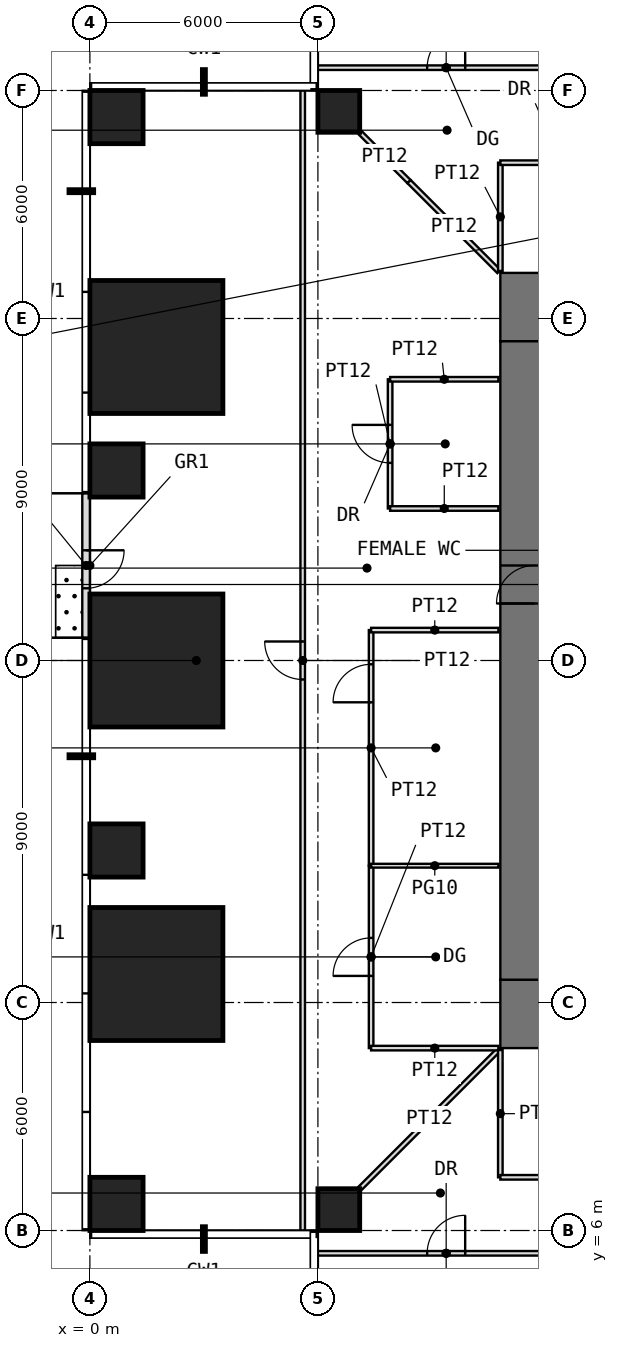
"""IFC4 building model, lengths in metres.
Left out: names, types, materials, properties, quantities, classifications, styles, units other than length and angle.
Written with IfcOpenShell. Run it as: python <this file> out.ifc"""

import sys

from ifc_helpers import new_model, si_unit, direction, frame, frame_2d, origin, origin_2d, place, context, subcontext, project, spatial, rectangle, extrude, element, fill, save


model = new_model("IFC4")
c1 = context("Model", 3, precision=1e-05, world=origin(), true_north=direction((0.0, 1.0)))
c2 = subcontext(c1, "Body", "Model", "MODEL_VIEW")
j1 = project(units=[si_unit("LENGTHUNIT", "METRE"), si_unit("PLANEANGLEUNIT", "RADIAN")], contexts=[c1])
p1 = place(None, origin())
s1 = spatial("IfcSite", under=j1, at=p1, CompositionType="ELEMENT")
p2 = place(p1, origin())
s2 = spatial("IfcBuilding", under=s1, at=p2, CompositionType="ELEMENT")
p3 = place(p2, frame((0.0, 0.0, 42.5)))
s3 = spatial("IfcBuildingStorey", under=s2, at=p3, CompositionType="ELEMENT", Elevation=42.5)
p4 = place(p3, frame((0.7, 6.7, 0.0), z_axis=(0.0, 0.0, 1.0), x_axis=(1.0, 0.0, 0.0)))
e1 = element("IfcColumn", 1, at=p4, inside=s3, PredefinedType="COLUMN", context=c2, shape_type="SweptSolid", body=[
    extrude(rectangle(XDim=1.4, YDim=1.4, at=origin_2d()), origin(), (0.0, 0.0, 1.0), 4.0),
])
p5 = place(p3, frame((6.55, 6.55, 0.0), z_axis=(0.0, 0.0, 1.0), x_axis=(1.0, 0.0, 0.0)))
e2 = element("IfcColumn", 2, at=p5, inside=s3, PredefinedType="COLUMN", context=c2, shape_type="SweptSolid", body=[
    extrude(rectangle(XDim=1.1, YDim=1.1, at=origin_2d()), origin(), (0.0, 0.0, 1.0), 4.0),
])
p6 = place(p3, frame((1.75, 12.75, 0.0), z_axis=(0.0, 0.0, 1.0), x_axis=(1.0, 0.0, 0.0)))
e3 = element("IfcColumn", 3, at=p6, inside=s3, PredefinedType="COLUMN", context=c2, shape_type="SweptSolid", body=[
    extrude(rectangle(XDim=3.5, YDim=3.5, at=origin_2d()), origin(), (0.0, 0.0, 1.0), 4.0),
])
p7 = place(p3, frame((0.7, 16.0, 0.0), z_axis=(0.0, 0.0, 1.0), x_axis=(1.0, 0.0, 0.0)))
e4 = element("IfcColumn", 4, at=p7, inside=s3, PredefinedType="COLUMN", context=c2, shape_type="SweptSolid", body=[
    extrude(rectangle(XDim=1.4, YDim=1.4, at=origin_2d()), origin(), (0.0, 0.0, 1.0), 4.0),
])
p8 = place(p3, frame((1.75, 21.0, 0.0), z_axis=(0.0, 0.0, 1.0), x_axis=(1.0, 0.0, 0.0)))
e5 = element("IfcColumn", 5, at=p8, inside=s3, PredefinedType="COLUMN", context=c2, shape_type="SweptSolid", body=[
    extrude(rectangle(XDim=3.5, YDim=3.5, at=origin_2d()), origin(), (0.0, 0.0, 1.0), 4.0),
])
p9 = place(p3, frame((0.7, 26.0, 0.0), z_axis=(0.0, 0.0, 1.0), x_axis=(1.0, 0.0, 0.0)))
e6 = element("IfcColumn", 6, at=p9, inside=s3, PredefinedType="COLUMN", context=c2, shape_type="SweptSolid", body=[
    extrude(rectangle(XDim=1.4, YDim=1.4, at=origin_2d()), origin(), (0.0, 0.0, 1.0), 4.0),
])
p10 = place(p3, frame((1.75, 29.25, 0.0), z_axis=(0.0, 0.0, 1.0), x_axis=(1.0, 0.0, 0.0)))
e7 = element("IfcColumn", 7, at=p10, inside=s3, PredefinedType="COLUMN", context=c2, shape_type="SweptSolid", body=[
    extrude(rectangle(XDim=3.5, YDim=3.5, at=origin_2d()), origin(), (0.0, 0.0, 1.0), 4.0),
])
p11 = place(p3, frame((0.7, 35.3, 0.0), z_axis=(0.0, 0.0, 1.0), x_axis=(1.0, 0.0, 0.0)))
e8 = element("IfcColumn", 8, at=p11, inside=s3, PredefinedType="COLUMN", context=c2, shape_type="SweptSolid", body=[
    extrude(rectangle(XDim=1.4, YDim=1.4, at=origin_2d()), origin(), (0.0, 0.0, 1.0), 4.0),
])
p12 = place(p3, frame((6.55, 35.45, 0.0), z_axis=(0.0, 0.0, 1.0), x_axis=(1.0, 0.0, 0.0)))
e9 = element("IfcColumn", 9, at=p12, inside=s3, PredefinedType="COLUMN", context=c2, shape_type="SweptSolid", body=[
    extrude(rectangle(XDim=1.1, YDim=1.1, at=origin_2d()), origin(), (0.0, 0.0, 1.0), 4.0),
])
p13 = place(p3, frame((-0.1, 25.4, 0.0), z_axis=(0.0, 0.0, 1.0), x_axis=(0.0, -1.0, 0.0)))
e10 = element("IfcWall", 10, at=p13, inside=s3, PredefinedType="USERDEFINED", context=c2, shape_type="SweptSolid", body=[
    extrude(rectangle(XDim=3.8, YDim=0.2, at=frame_2d((1.9, 0.0))), origin(), (0.0, 0.0, 1.0), 3.75),
])
p14 = place(p13, frame((1.5, 0.0, 0.0)))
e11 = element("IfcOpeningElement", 11, at=p14, cuts=e10, PredefinedType="OPENING", context=c2, shape_type="SweptSolid", body=[
    extrude(rectangle(XDim=1.0, YDim=2.4, at=frame_2d((0.5, 1.2))), frame((0.0, 0.11, 0.0), z_axis=(0.0, -1.0, 0.0), x_axis=(1.0, 0.0, 0.0)), (0.0, 0.0, 1.0), 0.22),
])
p15 = place(p3, frame((10.8, 11.7, -0.05), z_axis=(0.0, 0.0, 1.0), x_axis=(1.0, 0.0, 0.0)))
e12 = element("IfcWall", 12, at=p15, inside=s3, PredefinedType="SHEAR", context=c2, shape_type="SweptSolid", body=[
    extrude(rectangle(XDim=20.4, YDim=1.8, at=frame_2d((10.2, 0.0))), origin(), (0.0, 0.0, 1.0), 4.0),
])
p16 = place(p15, frame((9.2, 0.0, 0.05)))
e13 = element("IfcOpeningElement", 13, at=p16, cuts=e12, PredefinedType="OPENING", context=c2, shape_type="SweptSolid", body=[
    extrude(rectangle(XDim=2.0, YDim=2.2, at=frame_2d((1.0, 1.1))), frame((0.0, 0.91, 0.0), z_axis=(0.0, -1.0, 0.0), x_axis=(1.0, 0.0, 0.0)), (0.0, 0.0, 1.0), 1.82),
])
p17 = place(p3, frame((10.8, 30.3, -0.05), z_axis=(0.0, 0.0, 1.0), x_axis=(1.0, 0.0, 0.0)))
e14 = element("IfcWall", 14, at=p17, inside=s3, PredefinedType="SHEAR", context=c2, shape_type="SweptSolid", body=[
    extrude(rectangle(XDim=20.4, YDim=1.8, at=frame_2d((10.2, 0.0))), origin(), (0.0, 0.0, 1.0), 4.0),
])
p18 = place(p17, frame((9.2, 0.0, 0.05)))
e15 = element("IfcOpeningElement", 15, at=p18, cuts=e14, PredefinedType="OPENING", context=c2, shape_type="SweptSolid", body=[
    extrude(rectangle(XDim=2.0, YDim=2.2, at=frame_2d((1.0, 1.1))), frame((0.0, 0.91, 0.0), z_axis=(0.0, -1.0, 0.0), x_axis=(1.0, 0.0, 0.0)), (0.0, 0.0, 1.0), 1.82),
])
p19 = place(p3, frame((11.7, 12.6, -0.05), z_axis=(0.0, 0.0, 1.0), x_axis=(0.0, 1.0, 0.0)))
e16 = element("IfcWall", 16, at=p19, inside=s3, PredefinedType="SHEAR", context=c2, shape_type="SweptSolid", body=[
    extrude(rectangle(XDim=16.8, YDim=1.8, at=frame_2d((8.4, 0.0))), origin(), (0.0, 0.0, 1.0), 4.0),
])
p20 = place(p19, frame((9.9, 0.0, 0.05)))
e17 = element("IfcOpeningElement", 17, at=p20, cuts=e16, PredefinedType="OPENING", context=c2, shape_type="SweptSolid", body=[
    extrude(rectangle(XDim=1.0, YDim=2.2, at=frame_2d((0.5, 1.1))), frame((0.0, 0.91, 0.0), z_axis=(0.0, -1.0, 0.0), x_axis=(1.0, 0.0, 0.0)), (0.0, 0.0, 1.0), 1.82),
])
p21 = place(p3, frame((5.6, 6.0, 0.0), z_axis=(0.0, 0.0, 1.0), x_axis=(0.0, 1.0, 0.0)))
e18 = element("IfcWall", 18, at=p21, inside=s3, PredefinedType="PARTITIONING", context=c2, shape_type="SweptSolid", body=[
    extrude(rectangle(XDim=30.0, YDim=0.12, at=frame_2d((15.0, 0.0))), origin(), (0.0, 0.0, 1.0), 3.75),
])
p22 = place(p21, frame((14.5, 0.0, 0.0)))
e19 = element("IfcOpeningElement", 19, at=p22, cuts=e18, PredefinedType="OPENING", context=c2, shape_type="SweptSolid", body=[
    extrude(rectangle(XDim=1.0, YDim=2.4, at=frame_2d((0.5, 1.2))), frame((0.0, 0.07, 0.0), z_axis=(0.0, -1.0, 0.0), x_axis=(1.0, 0.0, 0.0)), (0.0, 0.0, 1.0), 0.14),
])
p23 = place(p3, frame((6.0, 5.4, 0.0), z_axis=(0.0, 0.0, 1.0), x_axis=(1.0, 0.0, 0.0)))
e20 = element("IfcWall", 20, at=p23, inside=s3, PredefinedType="PARTITIONING", context=c2, shape_type="SweptSolid", body=[
    extrude(rectangle(XDim=6.75, YDim=0.12, at=frame_2d((3.375, 0.0))), origin(), (0.0, 0.0, 1.0), 3.75),
])
p24 = place(p23, frame((2.875, 0.0, 0.0)))
e21 = element("IfcOpeningElement", 21, at=p24, cuts=e20, PredefinedType="OPENING", context=c2, shape_type="SweptSolid", body=[
    extrude(rectangle(XDim=1.0, YDim=2.2, at=frame_2d((0.5, 1.1))), frame((0.0, 0.07, 0.0), z_axis=(0.0, -1.0, 0.0), x_axis=(1.0, 0.0, 0.0)), (0.0, 0.0, 1.0), 0.14),
])
p25 = place(p3, frame((6.0, 36.6, 0.0), z_axis=(0.0, 0.0, 1.0), x_axis=(1.0, 0.0, 0.0)))
e22 = element("IfcWall", 22, at=p25, inside=s3, PredefinedType="PARTITIONING", context=c2, shape_type="SweptSolid", body=[
    extrude(rectangle(XDim=6.75, YDim=0.12, at=frame_2d((3.375, 0.0))), origin(), (0.0, 0.0, 1.0), 3.75),
])
p26 = place(p25, frame((2.875, 0.0, 0.0)))
e23 = element("IfcOpeningElement", 23, at=p26, cuts=e22, PredefinedType="OPENING", context=c2, shape_type="SweptSolid", body=[
    extrude(rectangle(XDim=1.0, YDim=2.4, at=frame_2d((0.5, 1.2))), frame((0.0, 0.07, 0.0), z_axis=(0.0, -1.0, 0.0), x_axis=(1.0, 0.0, 0.0)), (0.0, 0.0, 1.0), 0.14),
])
p27 = place(p3, frame((7.11, 7.11, 0.0), z_axis=(0.0, 0.0, 1.0), x_axis=(0.707106781187, 0.707106781187, 0.0)))
e24 = element("IfcWall", 24, at=p27, inside=s3, PredefinedType="PARTITIONING", context=c2, shape_type="SweptSolid", body=[
    extrude(rectangle(XDim=5.168, YDim=0.12, at=frame_2d((2.584, 0.0))), origin(), (0.0, 0.0, 1.0), 3.75),
])
p28 = place(p3, frame((7.11, 34.89, 0.0), z_axis=(0.0, 0.0, 1.0), x_axis=(0.707106781187, -0.707106781187, 0.0)))
e25 = element("IfcWall", 25, at=p28, inside=s3, PredefinedType="PARTITIONING", context=c2, shape_type="SweptSolid", body=[
    extrude(rectangle(XDim=1.822, YDim=0.12, at=frame_2d((0.911, 0.0))), origin(), (0.0, 0.0, 1.0), 3.75),
])
p29 = place(p3, frame((7.4, 10.8, 0.0), z_axis=(0.0, 0.0, 1.0), x_axis=(0.0, 1.0, 0.0)))
e26 = element("IfcWall", 26, at=p29, inside=s3, PredefinedType="PARTITIONING", context=c2, shape_type="SweptSolid", body=[
    extrude(rectangle(XDim=4.8, YDim=0.12, at=frame_2d((2.4, 0.0))), origin(), (0.0, 0.0, 1.0), 3.75),
])
p30 = place(p29, frame((1.9, 0.0, 0.0)))
e27 = element("IfcOpeningElement", 27, at=p30, cuts=e26, PredefinedType="OPENING", context=c2, shape_type="SweptSolid", body=[
    extrude(rectangle(XDim=1.0, YDim=2.4, at=frame_2d((0.5, 1.2))), frame((0.0, 0.07, 0.0), z_axis=(0.0, -1.0, 0.0), x_axis=(1.0, 0.0, 0.0)), (0.0, 0.0, 1.0), 0.14),
])
p31 = place(p3, frame((7.4, 10.8, 0.0), z_axis=(0.0, 0.0, 1.0), x_axis=(1.0, 0.0, 0.0)))
e28 = element("IfcWall", 28, at=p31, inside=s3, PredefinedType="PARTITIONING", context=c2, shape_type="SweptSolid", body=[
    extrude(rectangle(XDim=3.35, YDim=0.12, at=frame_2d((1.675, 0.0))), origin(), (0.0, 0.0, 1.0), 3.75),
])
p32 = place(p3, frame((7.4, 15.6, 0.0), z_axis=(0.0, 0.0, 1.0), x_axis=(0.0, 1.0, 0.0)))
e29 = element("IfcWall", 29, at=p32, inside=s3, PredefinedType="PARTITIONING", context=c2, shape_type="SweptSolid", body=[
    extrude(rectangle(XDim=6.2, YDim=0.12, at=frame_2d((3.1, 0.0))), origin(), (0.0, 0.0, 1.0), 3.75),
])
p33 = place(p32, frame((4.3, 0.0, 0.0)))
e30 = element("IfcOpeningElement", 30, at=p33, cuts=e29, PredefinedType="OPENING", context=c2, shape_type="SweptSolid", body=[
    extrude(rectangle(XDim=1.0, YDim=2.4, at=frame_2d((0.5, 1.2))), frame((0.0, 0.07, 0.0), z_axis=(0.0, -1.0, 0.0), x_axis=(1.0, 0.0, 0.0)), (0.0, 0.0, 1.0), 0.14),
])
p34 = place(p3, frame((7.4, 15.6, 0.0), z_axis=(0.0, 0.0, 1.0), x_axis=(1.0, 0.0, 0.0)))
e31 = element("IfcWall", 31, at=p34, inside=s3, PredefinedType="PARTITIONING", context=c2, shape_type="SweptSolid", body=[
    extrude(rectangle(XDim=3.35, YDim=0.1, at=frame_2d((1.675, 0.0))), origin(), (0.0, 0.0, 1.0), 3.75),
])
p35 = place(p3, frame((7.4, 21.8, 0.0), z_axis=(0.0, 0.0, 1.0), x_axis=(1.0, 0.0, 0.0)))
e32 = element("IfcWall", 32, at=p35, inside=s3, PredefinedType="PARTITIONING", context=c2, shape_type="SweptSolid", body=[
    extrude(rectangle(XDim=3.35, YDim=0.12, at=frame_2d((1.675, 0.0))), origin(), (0.0, 0.0, 1.0), 3.75),
])
p36 = place(p3, frame((7.9, 25.0, 0.0), z_axis=(0.0, 0.0, 1.0), x_axis=(0.0, 1.0, 0.0)))
e33 = element("IfcWall", 33, at=p36, inside=s3, PredefinedType="PARTITIONING", context=c2, shape_type="SweptSolid", body=[
    extrude(rectangle(XDim=3.4, YDim=0.12, at=frame_2d((1.7, 0.0))), origin(), (0.0, 0.0, 1.0), 3.75),
])
p37 = place(p36, frame((1.2, 0.0, 0.0)))
e34 = element("IfcOpeningElement", 34, at=p37, cuts=e33, PredefinedType="OPENING", context=c2, shape_type="SweptSolid", body=[
    extrude(rectangle(XDim=1.0, YDim=2.2, at=frame_2d((0.5, 1.1))), frame((0.0, 0.07, 0.0), z_axis=(0.0, -1.0, 0.0), x_axis=(1.0, 0.0, 0.0)), (0.0, 0.0, 1.0), 0.14),
])
for number, where, z_axis, x_axis in (
    (35, (7.9, 25.0, 0.0), (0.0, 0.0, 1.0), (1.0, 0.0, 0.0)),
    (36, (7.9, 28.4, 0.0), (0.0, 0.0, 1.0), (1.0, 0.0, 0.0)),
):
    element("IfcWall", number, at=place(p3, frame(where, z_axis=z_axis, x_axis=x_axis)), inside=s3, PredefinedType="PARTITIONING", context=c2, shape_type="SweptSolid", body=[
        extrude(rectangle(XDim=2.85, YDim=0.12, at=frame_2d((1.425, 0.0))), origin(), (0.0, 0.0, 1.0), 3.75),
    ])
p38 = place(p3, frame((8.398, 33.602, 0.0), z_axis=(0.0, 0.0, 1.0), x_axis=(0.707106781187, -0.707106781187, 0.0)))
e37 = element("IfcWall", 37, at=p38, inside=s3, PredefinedType="PARTITIONING", context=c2, shape_type="SweptSolid", body=[
    extrude(rectangle(XDim=3.346, YDim=0.12, at=frame_2d((1.673, 0.0))), origin(), (0.0, 0.0, 1.0), 3.75),
])
p39 = place(p3, frame((10.8, 7.4, 0.0), z_axis=(0.0, 0.0, 1.0), x_axis=(0.0, 1.0, 0.0)))
e38 = element("IfcWall", 38, at=p39, inside=s3, PredefinedType="PARTITIONING", context=c2, shape_type="SweptSolid", body=[
    extrude(rectangle(XDim=3.35, YDim=0.12, at=frame_2d((1.675, 0.0))), origin(), (0.0, 0.0, 1.0), 3.75),
])
p40 = place(p3, frame((10.8, 7.4, 0.0), z_axis=(0.0, 0.0, 1.0), x_axis=(1.0, 0.0, 0.0)))
e39 = element("IfcWall", 39, at=p40, inside=s3, PredefinedType="PARTITIONING", context=c2, shape_type="SweptSolid", body=[
    extrude(rectangle(XDim=4.0, YDim=0.12, at=frame_2d((2.0, 0.0))), origin(), (0.0, 0.0, 1.0), 3.75),
])
p41 = place(p40, frame((1.5, 0.0, 0.0)))
e40 = element("IfcOpeningElement", 40, at=p41, cuts=e39, PredefinedType="OPENING", context=c2, shape_type="SweptSolid", body=[
    extrude(rectangle(XDim=1.0, YDim=2.4, at=frame_2d((0.5, 1.2))), frame((0.0, 0.07, 0.0), z_axis=(0.0, -1.0, 0.0), x_axis=(1.0, 0.0, 0.0)), (0.0, 0.0, 1.0), 0.14),
])
p42 = place(p3, frame((10.8, 31.25, 0.0), z_axis=(0.0, 0.0, 1.0), x_axis=(0.0, 1.0, 0.0)))
e41 = element("IfcWall", 41, at=p42, inside=s3, PredefinedType="PARTITIONING", context=c2, shape_type="SweptSolid", body=[
    extrude(rectangle(XDim=2.85, YDim=0.12, at=frame_2d((1.425, 0.0))), origin(), (0.0, 0.0, 1.0), 3.75),
])
p43 = place(p3, frame((10.8, 34.1, 0.0), z_axis=(0.0, 0.0, 1.0), x_axis=(1.0, 0.0, 0.0)))
e42 = element("IfcWall", 42, at=p43, inside=s3, PredefinedType="PARTITIONING", context=c2, shape_type="SweptSolid", body=[
    extrude(rectangle(XDim=3.2, YDim=0.12, at=frame_2d((1.6, 0.0))), origin(), (0.0, 0.0, 1.0), 3.75),
])
p44 = place(p43, frame((1.1, 0.0, 0.0)))
e43 = element("IfcOpeningElement", 43, at=p44, cuts=e42, PredefinedType="OPENING", context=c2, shape_type="SweptSolid", body=[
    extrude(rectangle(XDim=1.0, YDim=2.2, at=frame_2d((0.5, 1.1))), frame((0.0, 0.07, 0.0), z_axis=(0.0, -1.0, 0.0), x_axis=(1.0, 0.0, 0.0)), (0.0, 0.0, 1.0), 0.14),
])
p45 = place(p14, origin())
e44 = element("IfcDoor", 44, at=p45, inside=s3, OperationType="SINGLE_SWING_LEFT", PredefinedType="DOOR", context=c2, shape_type="SweptSolid", body=[
    extrude(rectangle(XDim=1.0, YDim=2.4, at=frame_2d((0.5, 1.2))), frame((0.0, 0.025, 0.0), z_axis=(0.0, -1.0, 0.0), x_axis=(1.0, 0.0, 0.0)), (0.0, 0.0, 1.0), 0.05),
])
fill(e11, e44)
p46 = place(p20, origin())
e45 = element("IfcDoor", 45, at=p46, inside=s3, OperationType="SINGLE_SWING_LEFT", PredefinedType="DOOR", context=c2, shape_type="SweptSolid", body=[
    extrude(rectangle(XDim=1.0, YDim=2.2, at=frame_2d((0.5, 1.1))), frame((0.0, 0.025, 0.0), z_axis=(0.0, -1.0, 0.0), x_axis=(1.0, 0.0, 0.0)), (0.0, 0.0, 1.0), 0.05),
])
fill(e17, e45)
p47 = place(p24, origin())
e46 = element("IfcDoor", 46, at=p47, inside=s3, OperationType="SINGLE_SWING_RIGHT", PredefinedType="DOOR", context=c2, shape_type="SweptSolid", body=[
    extrude(rectangle(XDim=1.0, YDim=2.2, at=frame_2d((0.5, 1.1))), frame((0.0, 0.025, 0.0), z_axis=(0.0, -1.0, 0.0), x_axis=(1.0, 0.0, 0.0)), (0.0, 0.0, 1.0), 0.05),
])
fill(e21, e46)
p48 = place(p26, origin())
e47 = element("IfcDoor", 47, at=p48, inside=s3, OperationType="SINGLE_SWING_RIGHT", PredefinedType="DOOR", context=c2, shape_type="SweptSolid", body=[
    extrude(rectangle(XDim=1.0, YDim=2.4, at=frame_2d((0.5, 1.2))), frame((0.0, 0.025, 0.0), z_axis=(0.0, -1.0, 0.0), x_axis=(1.0, 0.0, 0.0)), (0.0, 0.0, 1.0), 0.05),
])
fill(e23, e47)
p49 = place(p30, origin())
e48 = element("IfcDoor", 48, at=p49, inside=s3, OperationType="SINGLE_SWING_LEFT", PredefinedType="DOOR", context=c2, shape_type="SweptSolid", body=[
    extrude(rectangle(XDim=1.0, YDim=2.4, at=frame_2d((0.5, 1.2))), frame((0.0, 0.025, 0.0), z_axis=(0.0, -1.0, 0.0), x_axis=(1.0, 0.0, 0.0)), (0.0, 0.0, 1.0), 0.05),
])
fill(e27, e48)
p50 = place(p37, origin())
e49 = element("IfcDoor", 49, at=p50, inside=s3, OperationType="SINGLE_SWING_RIGHT", PredefinedType="DOOR", context=c2, shape_type="SweptSolid", body=[
    extrude(rectangle(XDim=1.0, YDim=2.2, at=frame_2d((0.5, 1.1))), frame((0.0, 0.025, 0.0), z_axis=(0.0, -1.0, 0.0), x_axis=(1.0, 0.0, 0.0)), (0.0, 0.0, 1.0), 0.05),
])
fill(e34, e49)
p51 = place(p22, origin())
e50 = element("IfcDoor", 50, at=p51, inside=s3, OperationType="SINGLE_SWING_RIGHT", PredefinedType="DOOR", context=c2, shape_type="SweptSolid", body=[
    extrude(rectangle(XDim=1.0, YDim=2.4, at=frame_2d((0.5, 1.2))), frame((0.0, 0.025, 0.0), z_axis=(0.0, -1.0, 0.0), x_axis=(1.0, 0.0, 0.0)), (0.0, 0.0, 1.0), 0.05),
])
fill(e19, e50)
p52 = place(p33, origin())
e51 = element("IfcDoor", 51, at=p52, inside=s3, OperationType="SINGLE_SWING_LEFT", PredefinedType="DOOR", context=c2, shape_type="SweptSolid", body=[
    extrude(rectangle(XDim=1.0, YDim=2.4, at=frame_2d((0.5, 1.2))), frame((0.0, 0.025, 0.0), z_axis=(0.0, -1.0, 0.0), x_axis=(1.0, 0.0, 0.0)), (0.0, 0.0, 1.0), 0.05),
])
fill(e30, e51)
save(model, sys.argv[1])
